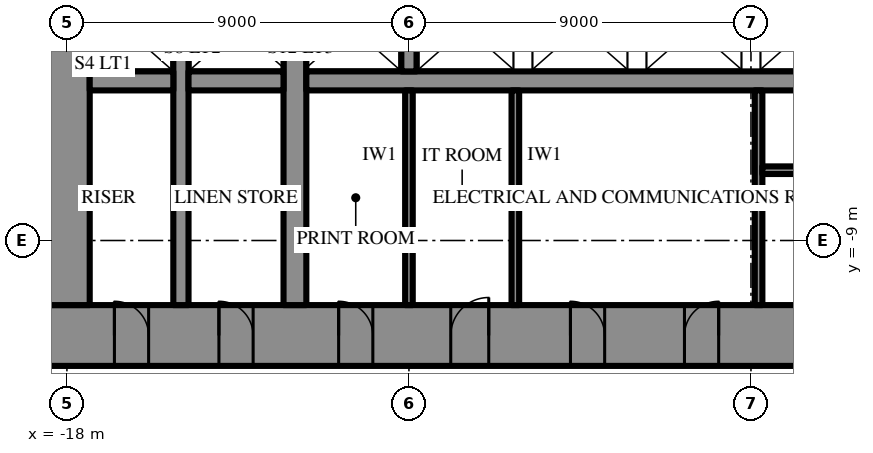
"""IFC4 building model, lengths in metres.
Left out: names, types, materials, properties, quantities, classifications, styles, units other than length and angle.
Written with IfcOpenShell. Run it as: python <this file> out.ifc"""

import sys

from ifc_helpers import new_model, si_unit, direction, frame, frame_2d, origin, place, context, subcontext, project, spatial, rectangle, extrude, element, fill, save


model = new_model("IFC4")
c1 = context("Model", 3, precision=1e-05, world=origin(), true_north=direction((0.0, 1.0)))
c2 = subcontext(c1, "Body", "Model", "MODEL_VIEW")
j1 = project(units=[si_unit("LENGTHUNIT", "METRE"), si_unit("PLANEANGLEUNIT", "RADIAN")], contexts=[c1])
p1 = place(None, origin())
s1 = spatial("IfcSite", under=j1, at=p1, CompositionType="ELEMENT")
p2 = place(p1, origin())
s2 = spatial("IfcBuilding", under=s1, at=p2, CompositionType="ELEMENT")
p3 = place(p2, frame((0.0, 0.0, 7.0)))
s3 = spatial("IfcBuildingStorey", under=s2, at=p3, CompositionType="ELEMENT", Elevation=7.0)
p4 = place(p3, frame((18.6, -11.5, 0.0), z_axis=(0.0, 0.0, 1.0), x_axis=(-1.0, 0.0, 0.0)))
e1 = element("IfcWall", 1, at=p4, inside=s3, PredefinedType="SHEAR", context=c2, shape_type="SweptSolid", body=[
    extrude(rectangle(XDim=37.2, YDim=1.6, at=frame_2d((18.6, 0.0))), origin(), (0.0, 0.0, 1.0), 6.0),
])
p5 = place(p4, frame((19.45, 0.0, 0.0)))
e2 = element("IfcOpeningElement", 2, at=p5, cuts=e1, PredefinedType="OPENING", context=c2, shape_type="SweptSolid", body=[
    extrude(rectangle(XDim=0.9, YDim=2.2, at=frame_2d((0.45, 1.1))), frame((0.0, 0.81, 0.0), z_axis=(0.0, -1.0, 0.0), x_axis=(1.0, 0.0, 0.0)), (0.0, 0.0, 1.0), 1.62),
])
p6 = place(p4, frame((22.45, 0.0, 0.0)))
e3 = element("IfcOpeningElement", 3, at=p6, cuts=e1, PredefinedType="OPENING", context=c2, shape_type="SweptSolid", body=[
    extrude(rectangle(XDim=0.9, YDim=2.2, at=frame_2d((0.45, 1.1))), frame((0.0, 0.81, 0.0), z_axis=(0.0, -1.0, 0.0), x_axis=(1.0, 0.0, 0.0)), (0.0, 0.0, 1.0), 1.62),
])
p7 = place(p4, frame((25.5, 0.0, 0.0)))
e4 = element("IfcOpeningElement", 4, at=p7, cuts=e1, PredefinedType="OPENING", context=c2, shape_type="SweptSolid", body=[
    extrude(rectangle(XDim=1.0, YDim=2.2, at=frame_2d((0.5, 1.1))), frame((0.0, 0.81, 0.0), z_axis=(0.0, -1.0, 0.0), x_axis=(1.0, 0.0, 0.0)), (0.0, 0.0, 1.0), 1.62),
])
p8 = place(p4, frame((1.85, 0.0, 0.0)))
e5 = element("IfcOpeningElement", 5, at=p8, cuts=e1, PredefinedType="OPENING", context=c2, shape_type="SweptSolid", body=[
    extrude(rectangle(XDim=0.9, YDim=2.2, at=frame_2d((0.45, 1.1))), frame((0.0, 0.81, 0.0), z_axis=(0.0, -1.0, 0.0), x_axis=(1.0, 0.0, 0.0)), (0.0, 0.0, 1.0), 1.62),
])
p9 = place(p4, frame((4.6, 0.0, 0.0)))
e6 = element("IfcOpeningElement", 6, at=p9, cuts=e1, PredefinedType="OPENING", context=c2, shape_type="SweptSolid", body=[
    extrude(rectangle(XDim=0.9, YDim=2.2, at=frame_2d((0.45, 1.1))), frame((0.0, 0.81, 0.0), z_axis=(0.0, -1.0, 0.0), x_axis=(1.0, 0.0, 0.0)), (0.0, 0.0, 1.0), 1.62),
])
p10 = place(p4, frame((7.75, 0.0, 0.0)))
e7 = element("IfcOpeningElement", 7, at=p10, cuts=e1, PredefinedType="OPENING", context=c2, shape_type="SweptSolid", body=[
    extrude(rectangle(XDim=0.9, YDim=2.2, at=frame_2d((0.45, 1.1))), frame((0.0, 0.81, 0.0), z_axis=(0.0, -1.0, 0.0), x_axis=(1.0, 0.0, 0.0)), (0.0, 0.0, 1.0), 1.62),
])
p11 = place(p4, frame((28.55, 0.0, 0.0)))
e8 = element("IfcOpeningElement", 8, at=p11, cuts=e1, PredefinedType="OPENING", context=c2, shape_type="SweptSolid", body=[
    extrude(rectangle(XDim=0.9, YDim=2.2, at=frame_2d((0.45, 1.1))), frame((0.0, 0.81, 0.0), z_axis=(0.0, -1.0, 0.0), x_axis=(1.0, 0.0, 0.0)), (0.0, 0.0, 1.0), 1.62),
])
p12 = place(p4, frame((31.7, 0.0, 0.0)))
e9 = element("IfcOpeningElement", 9, at=p12, cuts=e1, PredefinedType="OPENING", context=c2, shape_type="SweptSolid", body=[
    extrude(rectangle(XDim=0.9, YDim=2.2, at=frame_2d((0.45, 1.1))), frame((0.0, 0.81, 0.0), z_axis=(0.0, -1.0, 0.0), x_axis=(1.0, 0.0, 0.0)), (0.0, 0.0, 1.0), 1.62),
])
p13 = place(p4, frame((34.45, 0.0, 0.0)))
e10 = element("IfcOpeningElement", 10, at=p13, cuts=e1, PredefinedType="OPENING", context=c2, shape_type="SweptSolid", body=[
    extrude(rectangle(XDim=0.9, YDim=2.2, at=frame_2d((0.45, 1.1))), frame((0.0, 0.81, 0.0), z_axis=(0.0, -1.0, 0.0), x_axis=(1.0, 0.0, 0.0)), (0.0, 0.0, 1.0), 1.62),
])
p14 = place(p3, frame((-18.0, 10.7, 0.0), z_axis=(0.0, 0.0, 1.0), x_axis=(0.0, -1.0, 0.0)))
e11 = element("IfcWall", 11, at=p14, inside=s3, PredefinedType="SHEAR", context=c2, shape_type="SweptSolid", body=[
    extrude(rectangle(XDim=21.4, YDim=1.2, at=frame_2d((10.7, 0.0))), origin(), (0.0, 0.0, 1.0), 6.0),
])
p15 = place(p14, frame((9.8, 0.0, 0.0)))
e12 = element("IfcOpeningElement", 12, at=p15, cuts=e11, PredefinedType="OPENING", context=c2, shape_type="SweptSolid", body=[
    extrude(rectangle(XDim=1.8, YDim=2.4, at=frame_2d((0.9, 1.2))), frame((0.0, 0.61, 0.0), z_axis=(0.0, -1.0, 0.0), x_axis=(1.0, 0.0, 0.0)), (0.0, 0.0, 1.0), 1.22),
])
p16 = place(p3, frame((-12.0, -10.7, 0.0), z_axis=(0.0, 0.0, 1.0), x_axis=(0.0, 1.0, 0.0)))
e13 = element("IfcWall", 13, at=p16, inside=s3, PredefinedType="SHEAR", context=c2, shape_type="SweptSolid", body=[
    extrude(rectangle(XDim=21.4, YDim=0.6, at=frame_2d((10.7, 0.0))), origin(), (0.0, 0.0, 1.0), 6.0),
])
p17 = place(p16, frame((9.8, 0.0, 0.0)))
e14 = element("IfcOpeningElement", 14, at=p17, cuts=e13, PredefinedType="OPENING", context=c2, shape_type="SweptSolid", body=[
    extrude(rectangle(XDim=1.8, YDim=2.4, at=frame_2d((0.9, 1.2))), frame((0.0, 0.31, 0.0), z_axis=(0.0, -1.0, 0.0), x_axis=(1.0, 0.0, 0.0)), (0.0, 0.0, 1.0), 0.62),
])
p18 = place(p3, frame((-15.0, -10.7, 0.0), z_axis=(0.0, 0.0, 1.0), x_axis=(0.0, 1.0, 0.0)))
e15 = element("IfcWall", 15, at=p18, inside=s3, PredefinedType="SHEAR", context=c2, shape_type="SweptSolid", body=[
    extrude(rectangle(XDim=21.4, YDim=0.4, at=frame_2d((10.7, 0.0))), origin(), (0.0, 0.0, 1.0), 6.0),
])
p19 = place(p18, frame((9.8, 0.0, 0.0)))
e16 = element("IfcOpeningElement", 16, at=p19, cuts=e15, PredefinedType="OPENING", context=c2, shape_type="SweptSolid", body=[
    extrude(rectangle(XDim=1.8, YDim=2.4, at=frame_2d((0.9, 1.2))), frame((0.0, 0.21, 0.0), z_axis=(0.0, -1.0, 0.0), x_axis=(1.0, 0.0, 0.0)), (0.0, 0.0, 1.0), 0.42),
])
p20 = place(p3, frame((11.7, -4.8, 0.0), z_axis=(0.0, 0.0, 1.0), x_axis=(-1.0, 0.0, 0.0)))
e17 = element("IfcWall", 17, at=p20, inside=s3, PredefinedType="SHEAR", context=c2, shape_type="SweptSolid", body=[
    extrude(rectangle(XDim=23.4, YDim=0.5, at=frame_2d((11.7, 0.0))), origin(), (0.0, 0.0, 1.0), 6.0),
])
p21 = place(p20, frame((6.6, 0.0, 0.0)))
e18 = element("IfcOpeningElement", 18, at=p21, cuts=e17, PredefinedType="OPENING", context=c2, shape_type="SweptSolid", body=[
    extrude(rectangle(XDim=1.2, YDim=2.2, at=frame_2d((0.6, 1.1))), frame((0.0, 0.26, 0.0), z_axis=(0.0, -1.0, 0.0), x_axis=(1.0, 0.0, 0.0)), (0.0, 0.0, 1.0), 0.52),
])
p22 = place(p20, frame((3.6, 0.0, 0.0)))
e19 = element("IfcOpeningElement", 19, at=p22, cuts=e17, PredefinedType="OPENING", context=c2, shape_type="SweptSolid", body=[
    extrude(rectangle(XDim=1.2, YDim=2.2, at=frame_2d((0.6, 1.1))), frame((0.0, 0.26, 0.0), z_axis=(0.0, -1.0, 0.0), x_axis=(1.0, 0.0, 0.0)), (0.0, 0.0, 1.0), 0.52),
])
p23 = place(p3, frame((-12.3, -4.8, 0.0), z_axis=(0.0, 0.0, 1.0), x_axis=(-1.0, 0.0, 0.0)))
e20 = element("IfcWall", 20, at=p23, inside=s3, PredefinedType="SHEAR", context=c2, shape_type="SweptSolid", body=[
    extrude(rectangle(XDim=2.5, YDim=0.5, at=frame_2d((1.25, 0.0))), origin(), (0.0, 0.0, 1.0), 6.0),
])
p24 = place(p3, frame((-15.2, -4.8, 0.0), z_axis=(0.0, 0.0, 1.0), x_axis=(-1.0, 0.0, 0.0)))
e21 = element("IfcWall", 21, at=p24, inside=s3, PredefinedType="SHEAR", context=c2, shape_type="SweptSolid", body=[
    extrude(rectangle(XDim=2.2, YDim=0.5, at=frame_2d((1.1, 0.0))), origin(), (0.0, 0.0, 1.0), 6.0),
])
p25 = place(p3, frame((-9.0, -2.25, 0.0), z_axis=(0.0, 0.0, 1.0), x_axis=(0.0, -1.0, 0.0)))
e22 = element("IfcWall", 22, at=p25, inside=s3, PredefinedType="SHEAR", context=c2, shape_type="SweptSolid", body=[
    extrude(rectangle(XDim=2.3, YDim=0.4, at=frame_2d((1.15, 0.0))), origin(), (0.0, 0.0, 1.0), 6.0),
])
p26 = place(p3, frame((0.2, -5.05, 0.0), z_axis=(0.0, 0.0, 1.0), x_axis=(0.0, -1.0, 0.0)))
e23 = element("IfcWall", 23, at=p26, inside=s3, PredefinedType="SHEAR", context=c2, shape_type="SweptSolid", body=[
    extrude(rectangle(XDim=5.65, YDim=0.2, at=frame_2d((2.825, 0.0))), origin(), (0.0, 0.0, 1.0), 6.0),
])
p27 = place(p3, frame((8.9, -7.15, 0.0), z_axis=(0.0, 0.0, 1.0), x_axis=(-1.0, 0.0, 0.0)))
e24 = element("IfcWall", 24, at=p27, inside=s3, PredefinedType="SHEAR", context=c2, shape_type="SweptSolid", body=[
    extrude(rectangle(XDim=8.6, YDim=0.2, at=frame_2d((4.3, 0.0))), origin(), (0.0, 0.0, 1.0), 6.0),
])
p28 = place(p27, frame((0.3, 0.0, 0.0)))
e25 = element("IfcOpeningElement", 25, at=p28, cuts=e24, PredefinedType="OPENING", context=c2, shape_type="SweptSolid", body=[
    extrude(rectangle(XDim=1.0, YDim=2.2, at=frame_2d((0.5, 1.1))), frame((0.0, 0.11, 0.0), z_axis=(0.0, -1.0, 0.0), x_axis=(1.0, 0.0, 0.0)), (0.0, 0.0, 1.0), 0.22),
])
for number, where, z_axis, x_axis in (
    (26, (-9.0, -5.05, 0.0), (0.0, 0.0, 1.0), (0.0, -1.0, 0.0)),
    (27, (-6.2, -5.05, 0.0), (0.0, 0.0, 1.0), (0.0, -1.0, 0.0)),
):
    element("IfcWall", number, at=place(p3, frame(where, z_axis=z_axis, x_axis=x_axis)), inside=s3, PredefinedType="PARTITIONING", context=c2, shape_type="SweptSolid", body=[
        extrude(rectangle(XDim=5.65, YDim=0.2, at=frame_2d((2.825, 0.0))), origin(), (0.0, 0.0, 1.0), 5.65),
    ])
p29 = place(p5, frame((0.9, 0.0, 0.0), z_axis=(0.0, 0.0, 1.0), x_axis=(-1.0, 0.0, 0.0)))
e28 = element("IfcDoor", 28, at=p29, inside=s3, OperationType="SINGLE_SWING_LEFT", PredefinedType="DOOR", context=c2, shape_type="SweptSolid", body=[
    extrude(rectangle(XDim=0.9, YDim=2.2, at=frame_2d((0.45, 1.1))), frame((0.0, 0.025, 0.0), z_axis=(0.0, -1.0, 0.0), x_axis=(1.0, 0.0, 0.0)), (0.0, 0.0, 1.0), 0.05),
])
fill(e2, e28)
p30 = place(p6, frame((0.9, 0.0, 0.0), z_axis=(0.0, 0.0, 1.0), x_axis=(-1.0, 0.0, 0.0)))
e29 = element("IfcDoor", 29, at=p30, inside=s3, OperationType="SINGLE_SWING_RIGHT", PredefinedType="DOOR", context=c2, shape_type="SweptSolid", body=[
    extrude(rectangle(XDim=0.9, YDim=2.2, at=frame_2d((0.45, 1.1))), frame((0.0, 0.025, 0.0), z_axis=(0.0, -1.0, 0.0), x_axis=(1.0, 0.0, 0.0)), (0.0, 0.0, 1.0), 0.05),
])
fill(e3, e29)
p31 = place(p7, frame((1.0, 0.0, 0.0), z_axis=(0.0, 0.0, 1.0), x_axis=(-1.0, 0.0, 0.0)))
e30 = element("IfcDoor", 30, at=p31, inside=s3, OperationType="SINGLE_SWING_LEFT", PredefinedType="DOOR", context=c2, shape_type="SweptSolid", body=[
    extrude(rectangle(XDim=1.0, YDim=2.2, at=frame_2d((0.5, 1.1))), frame((0.0, 0.025, 0.0), z_axis=(0.0, -1.0, 0.0), x_axis=(1.0, 0.0, 0.0)), (0.0, 0.0, 1.0), 0.05),
])
fill(e4, e30)
p32 = place(p11, frame((0.9, 0.0, 0.0), z_axis=(0.0, 0.0, 1.0), x_axis=(-1.0, 0.0, 0.0)))
e31 = element("IfcDoor", 31, at=p32, inside=s3, OperationType="SINGLE_SWING_RIGHT", PredefinedType="DOOR", context=c2, shape_type="SweptSolid", body=[
    extrude(rectangle(XDim=0.9, YDim=2.2, at=frame_2d((0.45, 1.1))), frame((0.0, 0.025, 0.0), z_axis=(0.0, -1.0, 0.0), x_axis=(1.0, 0.0, 0.0)), (0.0, 0.0, 1.0), 0.05),
])
fill(e8, e31)
p33 = place(p12, frame((0.9, 0.0, 0.0), z_axis=(0.0, 0.0, 1.0), x_axis=(-1.0, 0.0, 0.0)))
e32 = element("IfcDoor", 32, at=p33, inside=s3, OperationType="SINGLE_SWING_RIGHT", PredefinedType="DOOR", context=c2, shape_type="SweptSolid", body=[
    extrude(rectangle(XDim=0.9, YDim=2.2, at=frame_2d((0.45, 1.1))), frame((0.0, 0.025, 0.0), z_axis=(0.0, -1.0, 0.0), x_axis=(1.0, 0.0, 0.0)), (0.0, 0.0, 1.0), 0.05),
])
fill(e9, e32)
p34 = place(p13, frame((0.9, 0.0, 0.0), z_axis=(0.0, 0.0, 1.0), x_axis=(-1.0, 0.0, 0.0)))
e33 = element("IfcDoor", 33, at=p34, inside=s3, OperationType="SINGLE_SWING_RIGHT", PredefinedType="DOOR", context=c2, shape_type="SweptSolid", body=[
    extrude(rectangle(XDim=0.9, YDim=2.2, at=frame_2d((0.45, 1.1))), frame((0.0, 0.025, 0.0), z_axis=(0.0, -1.0, 0.0), x_axis=(1.0, 0.0, 0.0)), (0.0, 0.0, 1.0), 0.05),
])
fill(e10, e33)
save(model, sys.argv[1])
